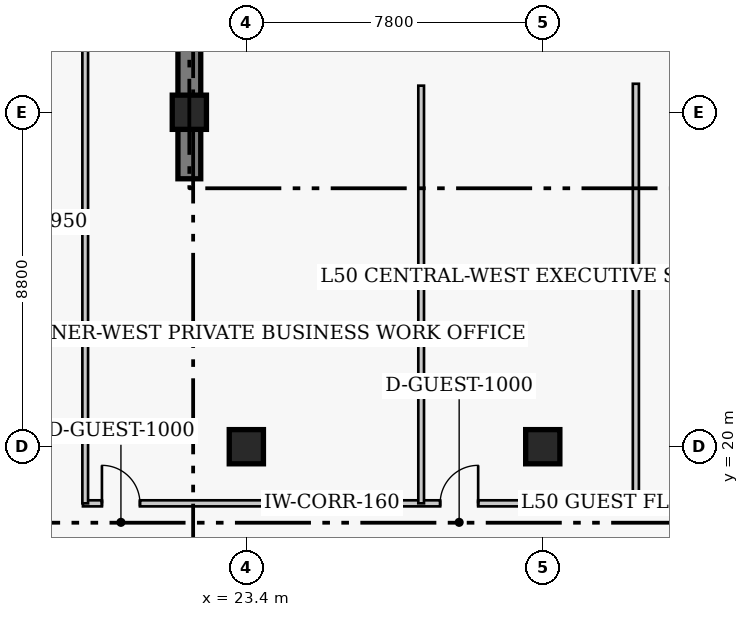
"""IFC4 building model, lengths in metres.
Left out: names, types, materials, properties, quantities, classifications, styles, units other than length and angle.
Written with IfcOpenShell. Run it as: python <this file> out.ifc"""

import sys

from ifc_helpers import new_model, si_unit, direction, frame, frame_2d, origin, origin_2d, place, context, subcontext, project, spatial, rectangle, extrude, element, fill, save


model = new_model("IFC4")
c1 = context("Model", 3, precision=1e-05, world=origin(), true_north=direction((0.0, 1.0)))
c2 = subcontext(c1, "Body", "Model", "MODEL_VIEW")
j1 = project(units=[si_unit("LENGTHUNIT", "METRE"), si_unit("PLANEANGLEUNIT", "RADIAN")], contexts=[c1])
p1 = place(None, origin())
s1 = spatial("IfcSite", under=j1, at=p1, CompositionType="ELEMENT")
p2 = place(p1, origin())
s2 = spatial("IfcBuilding", under=s1, at=p2, CompositionType="ELEMENT")
p3 = place(p2, frame((0.0, 0.0, 200.7)))
s3 = spatial("IfcBuildingStorey", under=s2, at=p3, CompositionType="ELEMENT", Elevation=200.7)
p4 = place(p3, frame((21.9, 27.05, 0.0), z_axis=(0.0, 0.0, 1.0), x_axis=(0.0, 1.0, 0.0)))
e1 = element("IfcWall", 1, at=p4, inside=s3, PredefinedType="SHEAR", context=c2, shape_type="SweptSolid", body=[
    extrude(rectangle(XDim=13.57, YDim=0.6, at=frame_2d((6.785, 0.0))), origin(), (0.0, 0.0, 1.0), 3.9),
])
for number, where, z_axis, x_axis in (
    (2, (23.4, 20.0, 0.0), (0.0, 0.0, 1.0), (1.0, 0.0, 0.0)),
    (3, (31.2, 20.0, 0.0), (0.0, 0.0, 1.0), (1.0, 0.0, 0.0)),
    (4, (21.9, 28.8, 0.0), (0.0, 0.0, 1.0), (1.0, 0.0, 0.0)),
):
    element("IfcColumn", number, at=place(p3, frame(where, z_axis=z_axis, x_axis=x_axis)), inside=s3, PredefinedType="COLUMN", context=c2, shape_type="SweptSolid", body=[
        extrude(rectangle(XDim=0.9, YDim=0.9, at=origin_2d()), origin(), (0.0, 0.0, 1.0), 3.9),
    ])
p5 = place(p3, frame((19.1, 18.51, 0.0), z_axis=(0.0, 0.0, 1.0), x_axis=(1.0, 0.0, 0.0)))
e5 = element("IfcWall", 5, at=p5, inside=s3, PredefinedType="PARTITIONING", context=c2, shape_type="SweptSolid", body=[
    extrude(rectangle(XDim=14.55, YDim=0.16, at=frame_2d((7.275, 0.0))), origin(), (0.0, 0.0, 1.0), 3.65),
])
p6 = place(p5, frame((0.5, 0.0, 0.0)))
e6 = element("IfcOpeningElement", 6, at=p6, cuts=e5, PredefinedType="OPENING", context=c2, shape_type="SweptSolid", body=[
    extrude(rectangle(XDim=1.0, YDim=2.15, at=frame_2d((0.5, 1.075))), frame((0.0, 0.09, 0.0), z_axis=(0.0, -1.0, 0.0), x_axis=(1.0, 0.0, 0.0)), (0.0, 0.0, 1.0), 0.18),
])
p7 = place(p5, frame((9.4, 0.0, 0.0)))
e7 = element("IfcOpeningElement", 7, at=p7, cuts=e5, PredefinedType="OPENING", context=c2, shape_type="SweptSolid", body=[
    extrude(rectangle(XDim=1.0, YDim=2.15, at=frame_2d((0.5, 1.075))), frame((0.0, 0.09, 0.0), z_axis=(0.0, -1.0, 0.0), x_axis=(1.0, 0.0, 0.0)), (0.0, 0.0, 1.0), 0.18),
])
p8 = place(p3, frame((33.65, 18.51, 0.0), z_axis=(0.0, 0.0, 1.0), x_axis=(0.0, 1.0, 0.0)))
e8 = element("IfcWall", 8, at=p8, inside=s3, PredefinedType="PARTITIONING", context=c2, shape_type="SweptSolid", body=[
    extrude(rectangle(XDim=11.04, YDim=0.16, at=frame_2d((5.52, 0.0))), origin(), (0.0, 0.0, 1.0), 3.65),
])
p9 = place(p3, frame((19.16, 18.51, 0.0), z_axis=(0.0, 0.0, 1.0), x_axis=(0.0, 1.0, 0.0)))
e9 = element("IfcWall", 9, at=p9, inside=s3, PredefinedType="PARTITIONING", context=c2, shape_type="SweptSolid", body=[
    extrude(rectangle(XDim=14.29, YDim=0.15, at=frame_2d((7.145, 0.0))), origin(), (0.0, 0.0, 1.0), 3.65),
])
p10 = place(p3, frame((28.0, 18.51, 0.0), z_axis=(0.0, 0.0, 1.0), x_axis=(0.0, 1.0, 0.0)))
e10 = element("IfcWall", 10, at=p10, inside=s3, PredefinedType="PARTITIONING", context=c2, shape_type="SweptSolid", body=[
    extrude(rectangle(XDim=10.99, YDim=0.15, at=frame_2d((5.495, 0.0))), origin(), (0.0, 0.0, 1.0), 3.65),
])
p11 = place(p6, origin())
e11 = element("IfcDoor", 11, at=p11, inside=s3, OperationType="SINGLE_SWING_LEFT", PredefinedType="DOOR", context=c2, shape_type="SweptSolid", body=[
    extrude(rectangle(XDim=1.0, YDim=2.15, at=frame_2d((0.5, 1.075))), frame((0.0, 0.025, 0.0), z_axis=(0.0, -1.0, 0.0), x_axis=(1.0, 0.0, 0.0)), (0.0, 0.0, 1.0), 0.05),
])
fill(e6, e11)
p12 = place(p7, origin())
e12 = element("IfcDoor", 12, at=p12, inside=s3, OperationType="SINGLE_SWING_RIGHT", PredefinedType="DOOR", context=c2, shape_type="SweptSolid", body=[
    extrude(rectangle(XDim=1.0, YDim=2.15, at=frame_2d((0.5, 1.075))), frame((0.0, 0.025, 0.0), z_axis=(0.0, -1.0, 0.0), x_axis=(1.0, 0.0, 0.0)), (0.0, 0.0, 1.0), 0.05),
])
fill(e7, e12)
save(model, sys.argv[1])
